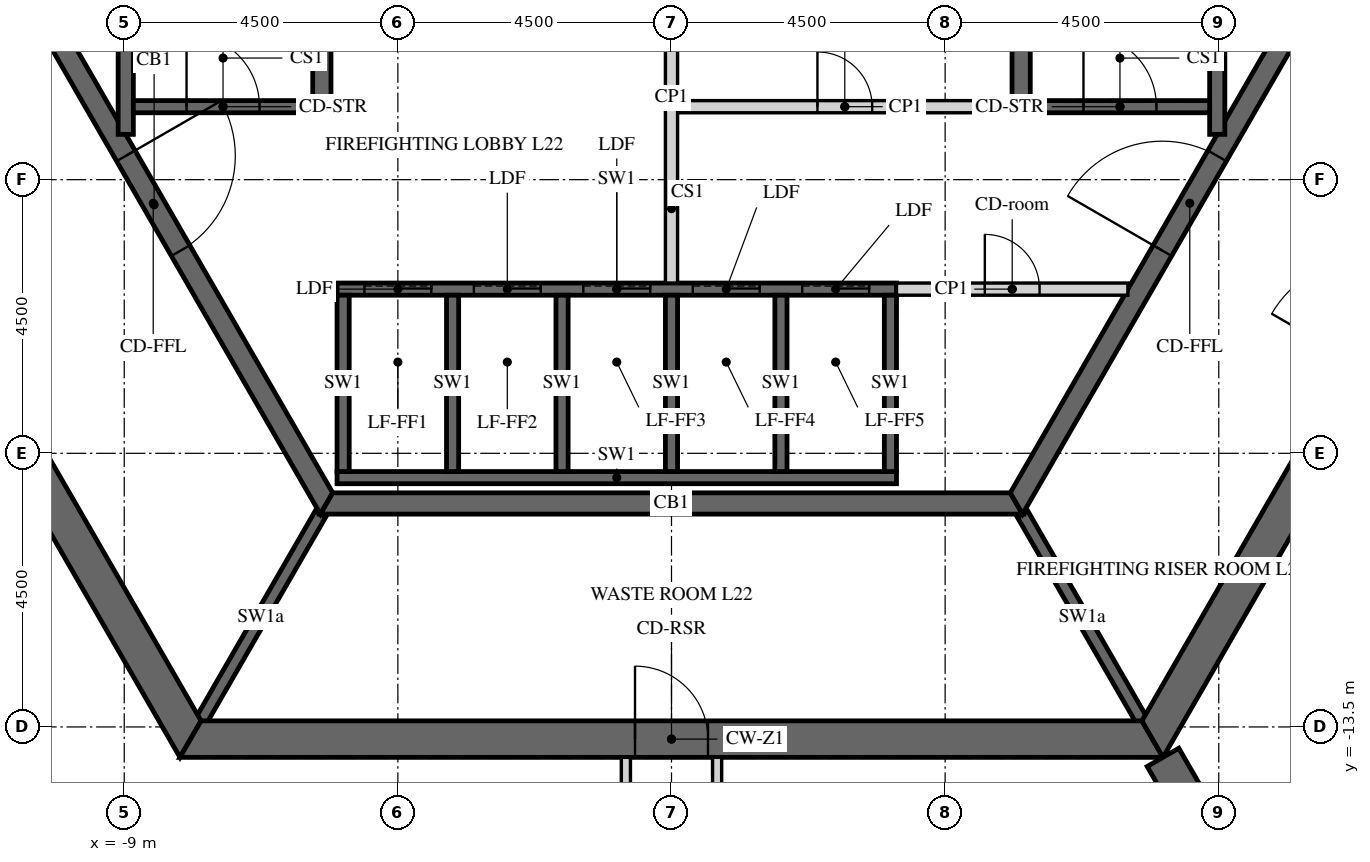
"""IFC4 building model, lengths in metres.
Left out: names, types, materials, properties, quantities, classifications, styles, units other than length and angle.
Written with IfcOpenShell. Run it as: python <this file> out.ifc"""

import sys

from ifc_helpers import new_model, si_unit, direction, frame, frame_2d, origin, place, context, subcontext, project, spatial, polyline, rectangle, outline, extrude, element, fill, save


model = new_model("IFC4")
c1 = context("Model", 3, precision=1e-05, world=origin(), true_north=direction((0.0, 1.0)))
c2 = subcontext(c1, "Body", "Model", "MODEL_VIEW")
j1 = project(units=[si_unit("LENGTHUNIT", "METRE"), si_unit("PLANEANGLEUNIT", "RADIAN")], contexts=[c1])
p1 = place(None, origin())
s1 = spatial("IfcSite", under=j1, at=p1, CompositionType="ELEMENT")
p2 = place(p1, origin())
s2 = spatial("IfcBuilding", under=s1, at=p2, CompositionType="ELEMENT")
p3 = place(p2, frame((0.0, 0.0, 99.9)))
s3 = spatial("IfcBuildingStorey", under=s2, at=p3, CompositionType="ELEMENT", Elevation=99.9)
p4 = place(p3, frame((-15.819, 0.0, -0.15), z_axis=(0.0, 0.0, 1.0), x_axis=(0.499999880136, -0.866025472988, 0.0)))
e1 = element("IfcWall", 1, at=p4, inside=s3, PredefinedType="SHEAR", context=c2, shape_type="SweptSolid", body=[
    extrude(outline(polyline([(-0.173, -0.3), (15.993, -0.3), (15.646, 0.3), (0.173, 0.3), (-0.173, -0.3)])), origin(), (0.0, 0.0, 1.0), 3.9),
])
p5 = place(p4, frame((6.981, 0.0, 0.15)))
e2 = element("IfcOpeningElement", 2, at=p5, cuts=e1, PredefinedType="OPENING", context=c2, shape_type="SweptSolid", body=[
    extrude(rectangle(XDim=1.8, YDim=2.4, at=frame_2d((0.9, 1.2))), frame((0.0, 0.31, 0.0), z_axis=(0.0, -1.0, 0.0), x_axis=(1.0, 0.0, 0.0)), (0.0, 0.0, 1.0), 0.62),
])
p6 = place(p3, frame((-7.91, -13.7, -0.15), z_axis=(0.0, 0.0, 1.0), x_axis=(1.0, 0.0, 0.0)))
e3 = element("IfcWall", 3, at=p6, inside=s3, PredefinedType="SHEAR", context=c2, shape_type="SweptSolid", body=[
    extrude(outline(polyline([(-0.173, -0.3), (15.993, -0.3), (15.646, 0.3), (0.173, 0.3), (-0.173, -0.3)])), origin(), (0.0, 0.0, 1.0), 3.9),
])
p7 = place(p6, frame((7.31, 0.0, 0.15)))
e4 = element("IfcOpeningElement", 4, at=p7, cuts=e3, PredefinedType="OPENING", context=c2, shape_type="SweptSolid", body=[
    extrude(rectangle(XDim=1.2, YDim=2.4, at=frame_2d((0.6, 1.2))), frame((0.0, 0.31, 0.0), z_axis=(0.0, -1.0, 0.0), x_axis=(1.0, 0.0, 0.0)), (0.0, 0.0, 1.0), 0.62),
])
p8 = place(p3, frame((7.91, -13.7, -0.15), z_axis=(0.0, 0.0, 1.0), x_axis=(0.499999880136, 0.866025472988, 0.0)))
e5 = element("IfcWall", 5, at=p8, inside=s3, PredefinedType="SHEAR", context=c2, shape_type="SweptSolid", body=[
    extrude(outline(polyline([(-0.173, -0.3), (15.993, -0.3), (15.646, 0.3), (0.173, 0.3), (-0.173, -0.3)])), origin(), (0.0, 0.0, 1.0), 3.9),
])
p9 = place(p8, frame((7.039, 0.0, 0.15)))
e6 = element("IfcOpeningElement", 6, at=p9, cuts=e5, PredefinedType="OPENING", context=c2, shape_type="SweptSolid", body=[
    extrude(rectangle(XDim=1.8, YDim=2.4, at=frame_2d((0.9, 1.2))), frame((0.0, 0.31, 0.0), z_axis=(0.0, -1.0, 0.0), x_axis=(1.0, 0.0, 0.0)), (0.0, 0.0, 1.0), 0.62),
])
p10 = place(p3, frame((8.083, -14.0, -0.15), z_axis=(0.0, 0.0, 1.0), x_axis=(0.499997680643, -0.866026742862, 0.0)))
e7 = element("IfcWall", 7, at=p10, inside=s3, PredefinedType="SHEAR", context=c2, shape_type="SweptSolid", body=[
    extrude(rectangle(XDim=16.509, YDim=0.6, at=frame_2d((8.254, 0.0))), origin(), (0.0, 0.0, 1.0), 3.9),
])
p11 = place(p10, frame((7.354, 0.0, 0.15)))
e8 = element("IfcOpeningElement", 8, at=p11, cuts=e7, PredefinedType="OPENING", context=c2, shape_type="SweptSolid", body=[
    extrude(rectangle(XDim=1.8, YDim=2.4, at=frame_2d((0.9, 1.2))), frame((0.0, 0.31, 0.0), z_axis=(0.0, -1.0, 0.0), x_axis=(1.0, 0.0, 0.0)), (0.0, 0.0, 1.0), 0.62),
])
p12 = place(p3, frame((-11.345, 0.0, -0.15), z_axis=(0.0, 0.0, 1.0), x_axis=(0.499995046907, -0.866028263435, 0.0)))
e9 = element("IfcWall", 9, at=p12, inside=s3, PredefinedType="SHEAR", context=c2, shape_type="SweptSolid", body=[
    extrude(outline(polyline([(-0.101, -0.175), (11.446, -0.175), (11.244, 0.175), (0.101, 0.175), (-0.101, -0.175)])), origin(), (0.0, 0.0, 1.0), 3.9),
])
p13 = place(p12, frame((4.744, 0.0, 0.15)))
e10 = element("IfcOpeningElement", 10, at=p13, cuts=e9, PredefinedType="OPENING", context=c2, shape_type="SweptSolid", body=[
    extrude(rectangle(XDim=1.8, YDim=2.4, at=frame_2d((0.9, 1.2))), frame((0.0, 0.185, 0.0), z_axis=(0.0, -1.0, 0.0), x_axis=(1.0, 0.0, 0.0)), (0.0, 0.0, 1.0), 0.37),
])
p14 = place(p3, frame((-5.673, -9.825, -0.15), z_axis=(0.0, 0.0, 1.0), x_axis=(1.0, 0.0, 0.0)))
e11 = element("IfcWall", 11, at=p14, inside=s3, PredefinedType="SHEAR", context=c2, shape_type="SweptSolid", body=[
    extrude(outline(polyline([(-0.101, -0.175), (11.446, -0.175), (11.244, 0.175), (0.101, 0.175), (-0.101, -0.175)])), origin(), (0.0, 0.0, 1.0), 3.9),
])
p15 = place(p3, frame((5.673, -9.825, -0.15), z_axis=(0.0, 0.0, 1.0), x_axis=(0.499995046907, 0.866028263435, 0.0)))
e12 = element("IfcWall", 12, at=p15, inside=s3, PredefinedType="SHEAR", context=c2, shape_type="SweptSolid", body=[
    extrude(outline(polyline([(-0.101, -0.175), (11.446, -0.175), (11.244, 0.175), (0.101, 0.175), (-0.101, -0.175)])), origin(), (0.0, 0.0, 1.0), 3.9),
])
p16 = place(p15, frame((4.801, 0.0, 0.15)))
e13 = element("IfcOpeningElement", 13, at=p16, cuts=e12, PredefinedType="OPENING", context=c2, shape_type="SweptSolid", body=[
    extrude(rectangle(XDim=1.8, YDim=2.4, at=frame_2d((0.9, 1.2))), frame((0.0, 0.185, 0.0), z_axis=(0.0, -1.0, 0.0), x_axis=(1.0, 0.0, 0.0)), (0.0, 0.0, 1.0), 0.37),
])
p17 = place(p3, frame((-5.5, -6.3, -0.25), z_axis=(0.0, 0.0, 1.0), x_axis=(1.0, 0.0, 0.0)))
e14 = element("IfcWall", 14, at=p17, inside=s3, PredefinedType="SHEAR", context=c2, shape_type="SweptSolid", body=[
    extrude(rectangle(XDim=9.2, YDim=0.2, at=frame_2d((4.6, 0.0))), origin(), (0.0, 0.0, 1.0), 3.9),
])
p18 = place(p17, frame((0.45, 0.0, 0.25)))
e15 = element("IfcOpeningElement", 15, at=p18, cuts=e14, PredefinedType="OPENING", context=c2, shape_type="SweptSolid", body=[
    extrude(rectangle(XDim=1.1, YDim=2.1, at=frame_2d((0.55, 1.05))), frame((0.0, 0.11, 0.0), z_axis=(0.0, -1.0, 0.0), x_axis=(1.0, 0.0, 0.0)), (0.0, 0.0, 1.0), 0.22),
])
p19 = place(p17, frame((2.25, 0.0, 0.25)))
e16 = element("IfcOpeningElement", 16, at=p19, cuts=e14, PredefinedType="OPENING", context=c2, shape_type="SweptSolid", body=[
    extrude(rectangle(XDim=1.1, YDim=2.1, at=frame_2d((0.55, 1.05))), frame((0.0, 0.11, 0.0), z_axis=(0.0, -1.0, 0.0), x_axis=(1.0, 0.0, 0.0)), (0.0, 0.0, 1.0), 0.22),
])
p20 = place(p17, frame((4.05, 0.0, 0.25)))
e17 = element("IfcOpeningElement", 17, at=p20, cuts=e14, PredefinedType="OPENING", context=c2, shape_type="SweptSolid", body=[
    extrude(rectangle(XDim=1.1, YDim=2.1, at=frame_2d((0.55, 1.05))), frame((0.0, 0.11, 0.0), z_axis=(0.0, -1.0, 0.0), x_axis=(1.0, 0.0, 0.0)), (0.0, 0.0, 1.0), 0.22),
])
p21 = place(p17, frame((5.85, 0.0, 0.25)))
e18 = element("IfcOpeningElement", 18, at=p21, cuts=e14, PredefinedType="OPENING", context=c2, shape_type="SweptSolid", body=[
    extrude(rectangle(XDim=1.1, YDim=2.1, at=frame_2d((0.55, 1.05))), frame((0.0, 0.11, 0.0), z_axis=(0.0, -1.0, 0.0), x_axis=(1.0, 0.0, 0.0)), (0.0, 0.0, 1.0), 0.22),
])
p22 = place(p17, frame((7.65, 0.0, 0.25)))
e19 = element("IfcOpeningElement", 19, at=p22, cuts=e14, PredefinedType="OPENING", context=c2, shape_type="SweptSolid", body=[
    extrude(rectangle(XDim=1.1, YDim=2.1, at=frame_2d((0.55, 1.05))), frame((0.0, 0.11, 0.0), z_axis=(0.0, -1.0, 0.0), x_axis=(1.0, 0.0, 0.0)), (0.0, 0.0, 1.0), 0.22),
])
p23 = place(p3, frame((-5.5, -9.4, -0.25), z_axis=(0.0, 0.0, 1.0), x_axis=(1.0, 0.0, 0.0)))
e20 = element("IfcWall", 20, at=p23, inside=s3, PredefinedType="SHEAR", context=c2, shape_type="SweptSolid", body=[
    extrude(rectangle(XDim=9.2, YDim=0.2, at=frame_2d((4.6, 0.0))), origin(), (0.0, 0.0, 1.0), 3.9),
])
for number, where, z_axis, x_axis in (
    (21, (-5.4, -9.3, -0.25), (0.0, 0.0, 1.0), (0.0, 1.0, 0.0)),
    (22, (-3.6, -9.3, -0.25), (0.0, 0.0, 1.0), (0.0, 1.0, 0.0)),
    (23, (-1.8, -9.3, -0.25), (0.0, 0.0, 1.0), (0.0, 1.0, 0.0)),
    (24, (0.0, -9.3, -0.25), (0.0, 0.0, 1.0), (0.0, 1.0, 0.0)),
    (25, (1.8, -9.3, -0.25), (0.0, 0.0, 1.0), (0.0, 1.0, 0.0)),
    (26, (3.6, -9.3, -0.25), (0.0, 0.0, 1.0), (0.0, 1.0, 0.0)),
):
    element("IfcWall", number, at=place(p3, frame(where, z_axis=z_axis, x_axis=x_axis)), inside=s3, PredefinedType="SHEAR", context=c2, shape_type="SweptSolid", body=[
        extrude(rectangle(XDim=2.9, YDim=0.2, at=frame_2d((1.45, 0.0))), origin(), (0.0, 0.0, 1.0), 3.9),
    ])
p24 = place(p3, frame((0.1, -3.3, 0.0), z_axis=(0.0, 0.0, 1.0), x_axis=(1.0, 0.0, 0.0)))
e27 = element("IfcWall", 27, at=p24, inside=s3, PredefinedType="PARTITIONING", context=c2, shape_type="SweptSolid", body=[
    extrude(rectangle(XDim=5.5, YDim=0.2, at=frame_2d((2.75, 0.0))), origin(), (0.0, 0.0, 1.0), 3.65),
])
p25 = place(p24, frame((2.3, 0.0, 0.0)))
e28 = element("IfcOpeningElement", 28, at=p25, cuts=e27, PredefinedType="OPENING", context=c2, shape_type="SweptSolid", body=[
    extrude(rectangle(XDim=0.9, YDim=2.1, at=frame_2d((0.45, 1.05))), frame((0.0, 0.11, 0.0), z_axis=(0.0, -1.0, 0.0), x_axis=(1.0, 0.0, 0.0)), (0.0, 0.0, 1.0), 0.22),
])
p26 = place(p3, frame((0.0, -6.2, 0.0), z_axis=(0.0, 0.0, 1.0), x_axis=(0.0, 1.0, 0.0)))
e29 = element("IfcWall", 29, at=p26, inside=s3, PredefinedType="PARTITIONING", context=c2, shape_type="SweptSolid", body=[
    extrude(rectangle(XDim=6.1, YDim=0.2, at=frame_2d((3.05, 0.0))), origin(), (0.0, 0.0, 1.0), 3.65),
])
p27 = place(p3, frame((3.7, -6.3, 0.0), z_axis=(0.0, 0.0, 1.0), x_axis=(1.0, 0.0, 0.0)))
e30 = element("IfcWall", 30, at=p27, inside=s3, PredefinedType="PARTITIONING", context=c2, shape_type="SweptSolid", body=[
    extrude(rectangle(XDim=3.806, YDim=0.2, at=frame_2d((1.903, 0.0))), origin(), (0.0, 0.0, 1.0), 3.65),
])
p28 = place(p27, frame((1.453, 0.0, 0.0)))
e31 = element("IfcOpeningElement", 31, at=p28, cuts=e30, PredefinedType="OPENING", context=c2, shape_type="SweptSolid", body=[
    extrude(rectangle(XDim=0.9, YDim=2.1, at=frame_2d((0.45, 1.05))), frame((0.0, 0.11, 0.0), z_axis=(0.0, -1.0, 0.0), x_axis=(1.0, 0.0, 0.0)), (0.0, 0.0, 1.0), 0.22),
])
for number, where, z_axis, x_axis in (
    (32, (-5.773, -10.0, -0.15), (0.0, 0.0, 1.0), (-0.5, -0.866, 0.0)),
    (33, (5.773, -10.0, -0.15), (0.0, 0.0, 1.0), (0.5, -0.866, 0.0)),
):
    element("IfcWall", number, at=place(p3, frame(where, z_axis=z_axis, x_axis=x_axis)), inside=s3, PredefinedType="SHEAR", context=c2, shape_type="SweptSolid", body=[
        extrude(rectangle(XDim=3.926, YDim=0.2, at=frame_2d((1.963, 0.0))), origin(), (0.0, 0.0, 1.0), 3.9),
    ])
p29 = place(p3, frame((5.75, -3.4, -0.25), z_axis=(0.0, 0.0, 1.0), x_axis=(0.0, 1.0, 0.0)))
e34 = element("IfcWall", 34, at=p29, inside=s3, PredefinedType="SHEAR", context=c2, shape_type="SweptSolid", body=[
    extrude(rectangle(XDim=6.8, YDim=0.3, at=frame_2d((3.4, 0.0))), origin(), (0.0, 0.0, 1.0), 3.9),
])
p30 = place(p3, frame((8.975, -3.755, -0.25), z_axis=(0.0, 0.0, 1.0), x_axis=(0.0, 1.0, 0.0)))
e35 = element("IfcWall", 35, at=p30, inside=s3, PredefinedType="SHEAR", context=c2, shape_type="SweptSolid", body=[
    extrude(rectangle(XDim=7.51, YDim=0.25, at=frame_2d((3.755, 0.0))), origin(), (0.0, 0.0, 1.0), 3.9),
])
p31 = place(p3, frame((5.9, -3.3, -0.25), z_axis=(0.0, 0.0, 1.0), x_axis=(1.0, 0.0, 0.0)))
e36 = element("IfcWall", 36, at=p31, inside=s3, PredefinedType="SHEAR", context=c2, shape_type="SweptSolid", body=[
    extrude(rectangle(XDim=2.95, YDim=0.2, at=frame_2d((1.475, 0.0))), origin(), (0.0, 0.0, 1.0), 3.9),
])
p32 = place(p31, frame((0.875, 0.0, 0.25)))
e37 = element("IfcOpeningElement", 37, at=p32, cuts=e36, PredefinedType="OPENING", context=c2, shape_type="SweptSolid", body=[
    extrude(rectangle(XDim=1.2, YDim=2.4, at=frame_2d((0.6, 1.2))), frame((0.0, 0.11, 0.0), z_axis=(0.0, -1.0, 0.0), x_axis=(1.0, 0.0, 0.0)), (0.0, 0.0, 1.0), 0.22),
])
p33 = place(p3, frame((-5.75, -3.4, -0.25), z_axis=(0.0, 0.0, 1.0), x_axis=(0.0, 1.0, 0.0)))
e38 = element("IfcWall", 38, at=p33, inside=s3, PredefinedType="SHEAR", context=c2, shape_type="SweptSolid", body=[
    extrude(rectangle(XDim=6.8, YDim=0.3, at=frame_2d((3.4, 0.0))), origin(), (0.0, 0.0, 1.0), 3.9),
])
p34 = place(p3, frame((-8.975, -3.755, -0.25), z_axis=(0.0, 0.0, 1.0), x_axis=(0.0, 1.0, 0.0)))
e39 = element("IfcWall", 39, at=p34, inside=s3, PredefinedType="SHEAR", context=c2, shape_type="SweptSolid", body=[
    extrude(rectangle(XDim=7.51, YDim=0.25, at=frame_2d((3.755, 0.0))), origin(), (0.0, 0.0, 1.0), 3.9),
])
p35 = place(p3, frame((-8.85, -3.3, -0.25), z_axis=(0.0, 0.0, 1.0), x_axis=(1.0, 0.0, 0.0)))
e40 = element("IfcWall", 40, at=p35, inside=s3, PredefinedType="SHEAR", context=c2, shape_type="SweptSolid", body=[
    extrude(rectangle(XDim=2.95, YDim=0.2, at=frame_2d((1.475, 0.0))), origin(), (0.0, 0.0, 1.0), 3.9),
])
p36 = place(p35, frame((0.875, 0.0, 0.25)))
e41 = element("IfcOpeningElement", 41, at=p36, cuts=e40, PredefinedType="OPENING", context=c2, shape_type="SweptSolid", body=[
    extrude(rectangle(XDim=1.2, YDim=2.4, at=frame_2d((0.6, 1.2))), frame((0.0, 0.11, 0.0), z_axis=(0.0, -1.0, 0.0), x_axis=(1.0, 0.0, 0.0)), (0.0, 0.0, 1.0), 0.22),
])
p37 = place(p3, frame((-0.75, -14.0, 0.0), z_axis=(0.0, 0.0, 1.0), x_axis=(0.0, -1.0, 0.0)))
e42 = element("IfcWall", 42, at=p37, inside=s3, PredefinedType="PARTITIONING", context=c2, shape_type="SweptSolid", body=[
    extrude(rectangle(XDim=6.552, YDim=0.15, at=frame_2d((3.276, 0.0))), origin(), (0.0, 0.0, 1.0), 2.988),
])
p38 = place(p3, frame((0.75, -20.372, 0.0), z_axis=(0.0, 0.0, 1.0), x_axis=(0.0, 1.0, 0.0)))
e43 = element("IfcWall", 43, at=p38, inside=s3, PredefinedType="PARTITIONING", context=c2, shape_type="SweptSolid", body=[
    extrude(rectangle(XDim=6.372, YDim=0.15, at=frame_2d((3.186, 0.0))), origin(), (0.0, 0.0, 1.0), 2.988),
])
p39 = place(p7, origin())
e44 = element("IfcDoor", 44, at=p39, inside=s3, OperationType="SINGLE_SWING_LEFT", PredefinedType="DOOR", context=c2, shape_type="SweptSolid", body=[
    extrude(rectangle(XDim=1.2, YDim=2.4, at=frame_2d((0.6, 1.2))), frame((0.0, 0.025, 0.0), z_axis=(0.0, -1.0, 0.0), x_axis=(1.0, 0.0, 0.0)), (0.0, 0.0, 1.0), 0.05),
])
fill(e4, e44)
p40 = place(p13, origin())
e45 = element("IfcDoor", 45, at=p40, inside=s3, OperationType="DOUBLE_DOOR_SINGLE_SWING", PredefinedType="DOOR", context=c2, shape_type="SweptSolid", body=[
    extrude(rectangle(XDim=1.8, YDim=2.4, at=frame_2d((0.9, 1.2))), frame((0.0, 0.025, 0.0), z_axis=(0.0, -1.0, 0.0), x_axis=(1.0, 0.0, 0.0)), (0.0, 0.0, 1.0), 0.05),
])
fill(e10, e45)
p41 = place(p16, origin())
e46 = element("IfcDoor", 46, at=p41, inside=s3, OperationType="DOUBLE_DOOR_SINGLE_SWING", PredefinedType="DOOR", context=c2, shape_type="SweptSolid", body=[
    extrude(rectangle(XDim=1.8, YDim=2.4, at=frame_2d((0.9, 1.2))), frame((0.0, 0.025, 0.0), z_axis=(0.0, -1.0, 0.0), x_axis=(1.0, 0.0, 0.0)), (0.0, 0.0, 1.0), 0.05),
])
fill(e13, e46)
p42 = place(p25, origin())
e47 = element("IfcDoor", 47, at=p42, inside=s3, OperationType="SINGLE_SWING_LEFT", PredefinedType="DOOR", context=c2, shape_type="SweptSolid", body=[
    extrude(rectangle(XDim=0.9, YDim=2.1, at=frame_2d((0.45, 1.05))), frame((0.0, 0.025, 0.0), z_axis=(0.0, -1.0, 0.0), x_axis=(1.0, 0.0, 0.0)), (0.0, 0.0, 1.0), 0.05),
])
fill(e28, e47)
p43 = place(p28, origin())
e48 = element("IfcDoor", 48, at=p43, inside=s3, OperationType="SINGLE_SWING_LEFT", PredefinedType="DOOR", context=c2, shape_type="SweptSolid", body=[
    extrude(rectangle(XDim=0.9, YDim=2.1, at=frame_2d((0.45, 1.05))), frame((0.0, 0.025, 0.0), z_axis=(0.0, -1.0, 0.0), x_axis=(1.0, 0.0, 0.0)), (0.0, 0.0, 1.0), 0.05),
])
fill(e31, e48)
p44 = place(p32, origin())
e49 = element("IfcDoor", 49, at=p44, inside=s3, OperationType="SINGLE_SWING_LEFT", PredefinedType="DOOR", context=c2, shape_type="SweptSolid", body=[
    extrude(rectangle(XDim=1.2, YDim=2.4, at=frame_2d((0.6, 1.2))), frame((0.0, 0.025, 0.0), z_axis=(0.0, -1.0, 0.0), x_axis=(1.0, 0.0, 0.0)), (0.0, 0.0, 1.0), 0.05),
])
fill(e37, e49)
p45 = place(p36, origin())
e50 = element("IfcDoor", 50, at=p45, inside=s3, OperationType="SINGLE_SWING_LEFT", PredefinedType="DOOR", context=c2, shape_type="SweptSolid", body=[
    extrude(rectangle(XDim=1.2, YDim=2.4, at=frame_2d((0.6, 1.2))), frame((0.0, 0.025, 0.0), z_axis=(0.0, -1.0, 0.0), x_axis=(1.0, 0.0, 0.0)), (0.0, 0.0, 1.0), 0.05),
])
fill(e41, e50)
p46 = place(p18, origin())
e51 = element("IfcDoor", 51, at=p46, inside=s3, OperationType="SLIDING_TO_LEFT", PredefinedType="DOOR", context=c2, shape_type="SweptSolid", body=[
    extrude(rectangle(XDim=1.1, YDim=2.1, at=frame_2d((0.55, 1.05))), frame((0.0, 0.025, 0.0), z_axis=(0.0, -1.0, 0.0), x_axis=(1.0, 0.0, 0.0)), (0.0, 0.0, 1.0), 0.05),
])
fill(e15, e51)
p47 = place(p19, origin())
e52 = element("IfcDoor", 52, at=p47, inside=s3, OperationType="SLIDING_TO_LEFT", PredefinedType="DOOR", context=c2, shape_type="SweptSolid", body=[
    extrude(rectangle(XDim=1.1, YDim=2.1, at=frame_2d((0.55, 1.05))), frame((0.0, 0.025, 0.0), z_axis=(0.0, -1.0, 0.0), x_axis=(1.0, 0.0, 0.0)), (0.0, 0.0, 1.0), 0.05),
])
fill(e16, e52)
p48 = place(p20, origin())
e53 = element("IfcDoor", 53, at=p48, inside=s3, OperationType="SLIDING_TO_LEFT", PredefinedType="DOOR", context=c2, shape_type="SweptSolid", body=[
    extrude(rectangle(XDim=1.1, YDim=2.1, at=frame_2d((0.55, 1.05))), frame((0.0, 0.025, 0.0), z_axis=(0.0, -1.0, 0.0), x_axis=(1.0, 0.0, 0.0)), (0.0, 0.0, 1.0), 0.05),
])
fill(e17, e53)
p49 = place(p21, origin())
e54 = element("IfcDoor", 54, at=p49, inside=s3, OperationType="SLIDING_TO_LEFT", PredefinedType="DOOR", context=c2, shape_type="SweptSolid", body=[
    extrude(rectangle(XDim=1.1, YDim=2.1, at=frame_2d((0.55, 1.05))), frame((0.0, 0.025, 0.0), z_axis=(0.0, -1.0, 0.0), x_axis=(1.0, 0.0, 0.0)), (0.0, 0.0, 1.0), 0.05),
])
fill(e18, e54)
p50 = place(p22, origin())
e55 = element("IfcDoor", 55, at=p50, inside=s3, OperationType="SLIDING_TO_LEFT", PredefinedType="DOOR", context=c2, shape_type="SweptSolid", body=[
    extrude(rectangle(XDim=1.1, YDim=2.1, at=frame_2d((0.55, 1.05))), frame((0.0, 0.025, 0.0), z_axis=(0.0, -1.0, 0.0), x_axis=(1.0, 0.0, 0.0)), (0.0, 0.0, 1.0), 0.05),
])
fill(e19, e55)
save(model, sys.argv[1])
